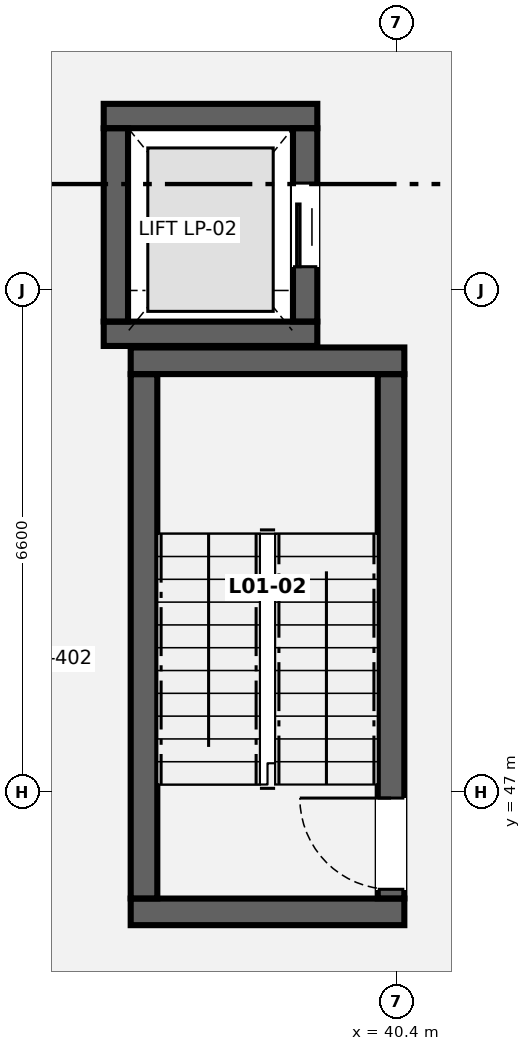
"""IFC4 building model, lengths in metres.
Left out: names, types, materials, properties, quantities, classifications, styles, units other than length and angle.
Written with IfcOpenShell. Run it as: python <this file> out.ifc"""

import sys

from ifc_helpers import new_model, si_unit, direction, frame, frame_2d, origin, place, context, subcontext, project, spatial, rectangle, extrude, element, fill, save


model = new_model("IFC4")
c1 = context("Model", 3, precision=1e-05, world=origin(), true_north=direction((0.0, 1.0)))
c2 = subcontext(c1, "Body", "Model", "MODEL_VIEW")
j1 = project(units=[si_unit("LENGTHUNIT", "METRE"), si_unit("PLANEANGLEUNIT", "RADIAN")], contexts=[c1])
p1 = place(None, origin())
s1 = spatial("IfcSite", under=j1, at=p1, CompositionType="ELEMENT")
p2 = place(p1, origin())
s2 = spatial("IfcBuilding", under=s1, at=p2, CompositionType="ELEMENT")
p3 = place(p2, frame((0.0, 0.0, 4.9)))
s3 = spatial("IfcBuildingStorey", under=s2, at=p3, CompositionType="ELEMENT", Elevation=4.9)
for number, where, z_axis, x_axis in (
    (1, (36.9, 45.425, 0.0), (0.0, 0.0, 1.0), (1.0, 0.0, 0.0)),
    (2, (36.9, 52.675, 0.0), (0.0, 0.0, 1.0), (1.0, 0.0, 0.0)),
):
    element("IfcWall", number, at=place(p3, frame(where, z_axis=z_axis, x_axis=x_axis)), inside=s3, PredefinedType="SHEAR", context=c2, shape_type="SweptSolid", body=[
        extrude(rectangle(XDim=3.6, YDim=0.35, at=frame_2d((1.8, 0.0))), origin(), (0.0, 0.0, 1.0), 3.98),
    ])
p4 = place(p3, frame((37.075, 45.602, 0.0), z_axis=(0.0, 0.0, 1.0), x_axis=(0.0, 1.0, 0.0)))
e3 = element("IfcWall", 3, at=p4, inside=s3, PredefinedType="SHEAR", context=c2, shape_type="SweptSolid", body=[
    extrude(rectangle(XDim=6.896, YDim=0.35, at=frame_2d((3.448, 0.0))), origin(), (0.0, 0.0, 1.0), 3.98),
])
p5 = place(p3, frame((40.325, 45.602, 0.0), z_axis=(0.0, 0.0, 1.0), x_axis=(0.0, 1.0, 0.0)))
e4 = element("IfcWall", 4, at=p5, inside=s3, PredefinedType="SHEAR", context=c2, shape_type="SweptSolid", body=[
    extrude(rectangle(XDim=6.896, YDim=0.35, at=frame_2d((3.448, 0.0))), origin(), (0.0, 0.0, 1.0), 3.98),
])
p6 = place(p5, frame((0.12, 0.0, 0.0)))
e5 = element("IfcOpeningElement", 5, at=p6, cuts=e4, PredefinedType="OPENING", context=c2, shape_type="SweptSolid", body=[
    extrude(rectangle(XDim=1.2, YDim=2.15, at=frame_2d((0.6, 1.075))), frame((0.0, 0.185, 0.0), z_axis=(0.0, -1.0, 0.0), x_axis=(1.0, 0.0, 0.0)), (0.0, 0.0, 1.0), 0.37),
])
for number, where, z_axis, x_axis in (
    (6, (36.545, 53.03, 0.0), (0.0, 0.0, 1.0), (1.0, 0.0, 0.0)),
    (7, (36.545, 55.895, 0.0), (0.0, 0.0, 1.0), (1.0, 0.0, 0.0)),
):
    element("IfcWall", number, at=place(p3, frame(where, z_axis=z_axis, x_axis=x_axis)), inside=s3, PredefinedType="SHEAR", context=c2, shape_type="SweptSolid", body=[
        extrude(rectangle(XDim=2.81, YDim=0.32, at=frame_2d((1.405, 0.0))), origin(), (0.0, 0.0, 1.0), 3.98),
    ])
p7 = place(p3, frame((36.705, 53.192, 0.0), z_axis=(0.0, 0.0, 1.0), x_axis=(0.0, 1.0, 0.0)))
e8 = element("IfcWall", 8, at=p7, inside=s3, PredefinedType="SHEAR", context=c2, shape_type="SweptSolid", body=[
    extrude(rectangle(XDim=2.541, YDim=0.32, at=frame_2d((1.271, 0.0))), origin(), (0.0, 0.0, 1.0), 3.98),
])
p8 = place(p3, frame((39.195, 53.192, 0.0), z_axis=(0.0, 0.0, 1.0), x_axis=(0.0, 1.0, 0.0)))
e9 = element("IfcWall", 9, at=p8, inside=s3, PredefinedType="SHEAR", context=c2, shape_type="SweptSolid", body=[
    extrude(rectangle(XDim=2.541, YDim=0.32, at=frame_2d((1.271, 0.0))), origin(), (0.0, 0.0, 1.0), 3.98),
])
p9 = place(p8, frame((0.72, 0.0, 0.0)))
e10 = element("IfcOpeningElement", 10, at=p9, cuts=e9, PredefinedType="OPENING", context=c2, shape_type="SweptSolid", body=[
    extrude(rectangle(XDim=1.1, YDim=2.15, at=frame_2d((0.55, 1.075))), frame((0.0, 0.17, 0.0), z_axis=(0.0, -1.0, 0.0), x_axis=(1.0, 0.0, 0.0)), (0.0, 0.0, 1.0), 0.34),
])
p10 = place(p6, origin())
e11 = element("IfcDoor", 11, at=p10, inside=s3, OperationType="SINGLE_SWING_RIGHT", PredefinedType="DOOR", context=c2, shape_type="SweptSolid", body=[
    extrude(rectangle(XDim=1.2, YDim=2.15, at=frame_2d((0.6, 1.075))), frame((0.0, 0.025, 0.0), z_axis=(0.0, -1.0, 0.0), x_axis=(1.0, 0.0, 0.0)), (0.0, 0.0, 1.0), 0.05),
])
fill(e5, e11)
p11 = place(p9, origin())
e12 = element("IfcDoor", 12, at=p11, inside=s3, OperationType="SLIDING_TO_LEFT", PredefinedType="DOOR", context=c2, shape_type="SweptSolid", body=[
    extrude(rectangle(XDim=1.1, YDim=2.15, at=frame_2d((0.55, 1.075))), frame((0.0, 0.025, 0.0), z_axis=(0.0, -1.0, 0.0), x_axis=(1.0, 0.0, 0.0)), (0.0, 0.0, 1.0), 0.05),
])
fill(e10, e12)
save(model, sys.argv[1])
